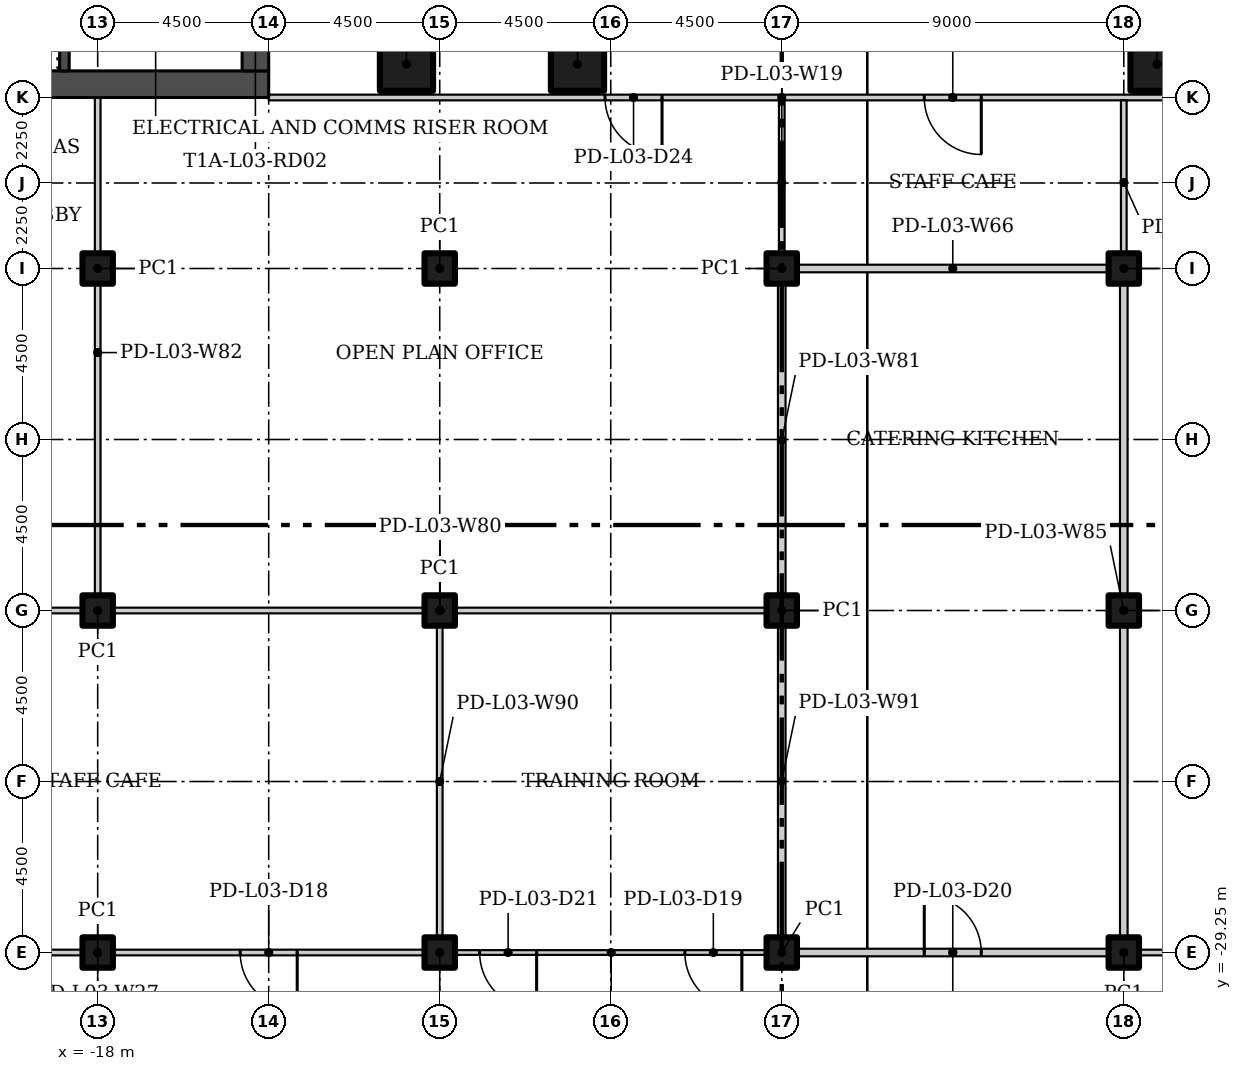
"""IFC4 building model, lengths in metres.
Left out: names, types, materials, properties, quantities, classifications, styles, units other than length and angle.
Written with IfcOpenShell. Run it as: python <this file> out.ifc"""

import sys

from ifc_helpers import new_model, si_unit, direction, frame, frame_2d, origin, origin_2d, place, context, subcontext, project, spatial, rectangle, hollow_rectangle, extrude, element, fill, save


model = new_model("IFC4")
c1 = context("Model", 3, precision=1e-05, world=origin(), true_north=direction((0.0, 1.0)))
c2 = subcontext(c1, "Body", "Model", "MODEL_VIEW")
j1 = project(units=[si_unit("LENGTHUNIT", "METRE"), si_unit("PLANEANGLEUNIT", "RADIAN")], contexts=[c1])
p1 = place(None, origin())
s1 = spatial("IfcSite", under=j1, at=p1, CompositionType="ELEMENT")
p2 = place(p1, origin())
s2 = spatial("IfcBuilding", under=s1, at=p2, CompositionType="ELEMENT")
p3 = place(p2, frame((0.0, 0.0, 18.5)))
s3 = spatial("IfcBuildingStorey", under=s2, at=p3, CompositionType="ELEMENT", Elevation=18.5)
for number, where in (
    (1, (-9.875, -5.875, 0.0)),
    (2, (-5.375, -5.875, 0.0)),
    (3, (9.875, -5.875, 0.0)),
):
    element("IfcColumn", number, at=place(p3, frame(where)), inside=s3, PredefinedType="COLUMN", context=c2, shape_type="SweptSolid", body=[
        extrude(hollow_rectangle(XDim=1.4, YDim=1.4, WallThickness=0.06, at=origin_2d()), origin(), (0.0, 0.0, 1.0), 4.6),
    ])
for number, where in (
    (4, (-18.0, -29.25, 0.0)),
    (5, (-18.0, -20.25, 0.0)),
    (6, (-18.0, -11.25, 0.0)),
    (7, (-9.0, -29.25, 0.0)),
    (8, (-9.0, -20.25, 0.0)),
    (9, (-9.0, -11.25, 0.0)),
    (10, (0.0, -29.25, 0.0)),
    (11, (0.0, -20.25, 0.0)),
    (12, (0.0, -11.25, 0.0)),
    (13, (9.0, -29.25, 0.0)),
    (14, (9.0, -20.25, 0.0)),
    (15, (9.0, -11.25, 0.0)),
):
    element("IfcColumn", number, at=place(p3, frame(where)), inside=s3, PredefinedType="COLUMN", context=c2, shape_type="SweptSolid", body=[
        extrude(hollow_rectangle(XDim=0.8, YDim=0.8, WallThickness=0.03, at=origin_2d()), origin(), (0.0, 0.0, 1.0), 4.6),
    ])
p4 = place(p3, frame((13.5, -6.75, 0.0), z_axis=(0.0, 0.0, 1.0), x_axis=(-1.0, 0.0, 0.0)))
e16 = element("IfcWall", 16, at=p4, inside=s3, PredefinedType="PARTITIONING", context=c2, shape_type="SweptSolid", body=[
    extrude(rectangle(XDim=27.0, YDim=0.15, at=frame_2d((13.5, 0.0))), origin(), (0.0, 0.0, 1.0), 4.6),
])
p5 = place(p4, frame((8.25, 0.0, 0.0)))
e17 = element("IfcOpeningElement", 17, at=p5, cuts=e16, PredefinedType="OPENING", context=c2, shape_type="SweptSolid", body=[
    extrude(rectangle(XDim=1.5, YDim=2.1, at=frame_2d((0.75, 1.05))), frame((0.0, 0.085, 0.0), z_axis=(0.0, -1.0, 0.0), x_axis=(1.0, 0.0, 0.0)), (0.0, 0.0, 1.0), 0.17),
])
p6 = place(p4, frame((16.65, 0.0, 0.0)))
e18 = element("IfcOpeningElement", 18, at=p6, cuts=e16, PredefinedType="OPENING", context=c2, shape_type="SweptSolid", body=[
    extrude(rectangle(XDim=1.5, YDim=2.1, at=frame_2d((0.75, 1.05))), frame((0.0, 0.085, 0.0), z_axis=(0.0, -1.0, 0.0), x_axis=(1.0, 0.0, 0.0)), (0.0, 0.0, 1.0), 0.17),
])
p7 = place(p3, frame((8.9, -29.25, 0.0)))
e19 = element("IfcWall", 19, at=p7, inside=s3, PredefinedType="PARTITIONING", context=c2, shape_type="SweptSolid", body=[
    extrude(rectangle(XDim=9.175, YDim=0.15, at=frame_2d((4.587, 0.0))), origin(), (0.0, 0.0, 1.0), 4.6),
])
p8 = place(p7, frame((3.85, 0.0, 0.0)))
e20 = element("IfcOpeningElement", 20, at=p8, cuts=e19, PredefinedType="OPENING", context=c2, shape_type="SweptSolid", body=[
    extrude(rectangle(XDim=1.5, YDim=2.1, at=frame_2d((0.75, 1.05))), frame((0.0, 0.085, 0.0), z_axis=(0.0, -1.0, 0.0), x_axis=(1.0, 0.0, 0.0)), (0.0, 0.0, 1.0), 0.17),
])
p9 = place(p3, frame((-8.925, -29.25, 0.0), z_axis=(0.0, 0.0, 1.0), x_axis=(-1.0, 0.0, 0.0)))
e21 = element("IfcWall", 21, at=p9, inside=s3, PredefinedType="PARTITIONING", context=c2, shape_type="SweptSolid", body=[
    extrude(rectangle(XDim=18.15, YDim=0.15, at=frame_2d((9.075, 0.0))), origin(), (0.0, 0.0, 1.0), 4.6),
])
p10 = place(p9, frame((3.825, 0.0, 0.0)))
e22 = element("IfcOpeningElement", 22, at=p10, cuts=e21, PredefinedType="OPENING", context=c2, shape_type="SweptSolid", body=[
    extrude(rectangle(XDim=1.5, YDim=2.1, at=frame_2d((0.75, 1.05))), frame((0.0, 0.085, 0.0), z_axis=(0.0, -1.0, 0.0), x_axis=(1.0, 0.0, 0.0)), (0.0, 0.0, 1.0), 0.17),
])
p11 = place(p3, frame((-0.1, -29.25, 0.0)))
e23 = element("IfcWall", 23, at=p11, inside=s3, PredefinedType="PARTITIONING", context=c2, shape_type="SweptSolid", body=[
    extrude(rectangle(XDim=9.2, YDim=0.2, at=frame_2d((4.6, 0.0))), origin(), (0.0, 0.0, 1.0), 4.6),
])
p12 = place(p11, frame((3.85, 0.0, 0.0)))
e24 = element("IfcOpeningElement", 24, at=p12, cuts=e23, PredefinedType="OPENING", context=c2, shape_type="SweptSolid", body=[
    extrude(rectangle(XDim=1.5, YDim=2.4, at=frame_2d((0.75, 1.2))), frame((0.0, 0.11, 0.0), z_axis=(0.0, -1.0, 0.0), x_axis=(1.0, 0.0, 0.0)), (0.0, 0.0, 1.0), 0.22),
])
p13 = place(p3, frame((0.1, -29.25, 0.0), z_axis=(0.0, 0.0, 1.0), x_axis=(-1.0, 0.0, 0.0)))
e25 = element("IfcWall", 25, at=p13, inside=s3, PredefinedType="PARTITIONING", context=c2, shape_type="SweptSolid", body=[
    extrude(rectangle(XDim=9.175, YDim=0.125, at=frame_2d((4.587, 0.0))), origin(), (0.0, 0.0, 1.0), 4.6),
])
p14 = place(p13, frame((1.15, 0.0, 0.0)))
e26 = element("IfcOpeningElement", 26, at=p14, cuts=e25, PredefinedType="OPENING", context=c2, shape_type="SweptSolid", body=[
    extrude(rectangle(XDim=1.5, YDim=2.1, at=frame_2d((0.75, 1.05))), frame((0.0, 0.073, 0.0), z_axis=(0.0, -1.0, 0.0), x_axis=(1.0, 0.0, 0.0)), (0.0, 0.0, 1.0), 0.145),
])
p15 = place(p13, frame((6.55, 0.0, 0.0)))
e27 = element("IfcOpeningElement", 27, at=p15, cuts=e25, PredefinedType="OPENING", context=c2, shape_type="SweptSolid", body=[
    extrude(rectangle(XDim=1.5, YDim=2.1, at=frame_2d((0.75, 1.05))), frame((0.0, 0.073, 0.0), z_axis=(0.0, -1.0, 0.0), x_axis=(1.0, 0.0, 0.0)), (0.0, 0.0, 1.0), 0.145),
])
p16 = place(p3, frame((9.1, -11.25, 0.0), z_axis=(0.0, 0.0, 1.0), x_axis=(-1.0, 0.0, 0.0)))
e28 = element("IfcWall", 28, at=p16, inside=s3, PredefinedType="PARTITIONING", context=c2, shape_type="SweptSolid", body=[
    extrude(rectangle(XDim=9.2, YDim=0.2, at=frame_2d((4.6, 0.0))), origin(), (0.0, 0.0, 1.0), 4.6),
])
p17 = place(p3, frame((-18.075, -20.25, 0.0)))
e29 = element("IfcWall", 29, at=p17, inside=s3, PredefinedType="PARTITIONING", context=c2, shape_type="SweptSolid", body=[
    extrude(rectangle(XDim=18.175, YDim=0.15, at=frame_2d((9.087, 0.0))), origin(), (0.0, 0.0, 1.0), 4.6),
])
p18 = place(p3, frame((0.0, -20.175, 0.0), z_axis=(0.0, 0.0, 1.0), x_axis=(0.0, 1.0, 0.0)))
e30 = element("IfcWall", 30, at=p18, inside=s3, PredefinedType="PARTITIONING", context=c2, shape_type="SweptSolid", body=[
    extrude(rectangle(XDim=8.825, YDim=0.2, at=frame_2d((4.413, 0.0))), origin(), (0.0, 0.0, 1.0), 4.6),
])
p19 = place(p3, frame((-18.0, -6.75, 0.0), z_axis=(0.0, 0.0, 1.0), x_axis=(0.0, -1.0, 0.0)))
e31 = element("IfcWall", 31, at=p19, inside=s3, PredefinedType="PARTITIONING", context=c2, shape_type="SweptSolid", body=[
    extrude(rectangle(XDim=13.425, YDim=0.15, at=frame_2d((6.712, 0.0))), origin(), (0.0, 0.0, 1.0), 4.6),
])
p20 = place(p3, frame((0.0, -11.15, 0.0), z_axis=(0.0, 0.0, 1.0), x_axis=(0.0, 1.0, 0.0)))
e32 = element("IfcWall", 32, at=p20, inside=s3, PredefinedType="PARTITIONING", context=c2, shape_type="SweptSolid", body=[
    extrude(rectangle(XDim=4.325, YDim=0.15, at=frame_2d((2.163, 0.0))), origin(), (0.0, 0.0, 1.0), 4.6),
])
p21 = place(p3, frame((9.0, -11.35, 0.0), z_axis=(0.0, 0.0, 1.0), x_axis=(0.0, -1.0, 0.0)))
e33 = element("IfcWall", 33, at=p21, inside=s3, PredefinedType="PARTITIONING", context=c2, shape_type="SweptSolid", body=[
    extrude(rectangle(XDim=17.8, YDim=0.2, at=frame_2d((8.9, 0.0))), origin(), (0.0, 0.0, 1.0), 4.6),
])
p22 = place(p3, frame((9.0, -6.825, 0.0), z_axis=(0.0, 0.0, 1.0), x_axis=(0.0, -1.0, 0.0)))
e34 = element("IfcWall", 34, at=p22, inside=s3, PredefinedType="PARTITIONING", context=c2, shape_type="SweptSolid", body=[
    extrude(rectangle(XDim=4.325, YDim=0.15, at=frame_2d((2.163, 0.0))), origin(), (0.0, 0.0, 1.0), 4.6),
])
p23 = place(p3, frame((-17.925, -20.25, 0.0), z_axis=(0.0, 0.0, 1.0), x_axis=(-1.0, 0.0, 0.0)))
e35 = element("IfcWall", 35, at=p23, inside=s3, PredefinedType="PARTITIONING", context=c2, shape_type="SweptSolid", body=[
    extrude(rectangle(XDim=9.15, YDim=0.15, at=frame_2d((4.575, 0.0))), origin(), (0.0, 0.0, 1.0), 4.6),
])
p24 = place(p3, frame((-9.0, -29.175, 0.0), z_axis=(0.0, 0.0, 1.0), x_axis=(0.0, 1.0, 0.0)))
e36 = element("IfcWall", 36, at=p24, inside=s3, PredefinedType="PARTITIONING", context=c2, shape_type="SweptSolid", body=[
    extrude(rectangle(XDim=8.85, YDim=0.15, at=frame_2d((4.425, 0.0))), origin(), (0.0, 0.0, 1.0), 4.6),
])
p25 = place(p3, frame((0.0, -20.325, 0.0), z_axis=(0.0, 0.0, 1.0), x_axis=(0.0, -1.0, 0.0)))
e37 = element("IfcWall", 37, at=p25, inside=s3, PredefinedType="PARTITIONING", context=c2, shape_type="SweptSolid", body=[
    extrude(rectangle(XDim=8.825, YDim=0.2, at=frame_2d((4.413, 0.0))), origin(), (0.0, 0.0, 1.0), 4.6),
])
p26 = place(p3, frame((-27.0, -6.4, 0.0)))
e38 = element("IfcWall", 38, at=p26, inside=s3, PredefinedType="SHEAR", context=c2, shape_type="SweptSolid", body=[
    extrude(rectangle(XDim=13.5, YDim=0.7, at=frame_2d((6.75, 0.0))), origin(), (0.0, 0.0, 1.0), 4.6),
])
p27 = place(p3, frame((-13.85, 6.05, 0.0), z_axis=(0.0, 0.0, 1.0), x_axis=(0.0, -1.0, 0.0)))
e39 = element("IfcWall", 39, at=p27, inside=s3, PredefinedType="SHEAR", context=c2, shape_type="SweptSolid", body=[
    extrude(rectangle(XDim=12.1, YDim=0.7, at=frame_2d((6.05, 0.0))), origin(), (0.0, 0.0, 1.0), 4.6),
])
p28 = place(p27, frame((10.1, 0.0, 0.0)))
e40 = element("IfcOpeningElement", 40, at=p28, cuts=e39, PredefinedType="OPENING", context=c2, shape_type="SweptSolid", body=[
    extrude(rectangle(XDim=1.2, YDim=2.1, at=frame_2d((0.6, 1.05))), frame((0.0, 0.36, 0.0), z_axis=(0.0, -1.0, 0.0), x_axis=(1.0, 0.0, 0.0)), (0.0, 0.0, 1.0), 0.72),
])
p29 = place(p27, frame((3.9, 0.0, 0.0)))
e41 = element("IfcOpeningElement", 41, at=p29, cuts=e39, PredefinedType="OPENING", context=c2, shape_type="SweptSolid", body=[
    extrude(rectangle(XDim=1.8, YDim=2.4, at=frame_2d((0.9, 1.2))), frame((0.0, 0.36, 0.0), z_axis=(0.0, -1.0, 0.0), x_axis=(1.0, 0.0, 0.0)), (0.0, 0.0, 1.0), 0.72),
])
p30 = place(p3, frame((-18.875, -6.05, 0.0), z_axis=(0.0, 0.0, 1.0), x_axis=(0.0, 1.0, 0.0)))
e42 = element("IfcWall", 42, at=p30, inside=s3, PredefinedType="SHEAR", context=c2, shape_type="SweptSolid", body=[
    extrude(rectangle(XDim=2.55, YDim=0.25, at=frame_2d((1.275, 0.0))), origin(), (0.0, 0.0, 1.0), 4.6),
])
p31 = place(p10, origin())
e43 = element("IfcDoor", 43, at=p31, inside=s3, OperationType="DOUBLE_DOOR_SINGLE_SWING", PredefinedType="DOOR", context=c2, shape_type="SweptSolid", body=[
    extrude(rectangle(XDim=1.5, YDim=2.1, at=frame_2d((0.75, 1.05))), frame((0.0, 0.025, 0.0), z_axis=(0.0, -1.0, 0.0), x_axis=(1.0, 0.0, 0.0)), (0.0, 0.0, 1.0), 0.05),
])
fill(e22, e43)
p32 = place(p14, origin())
e44 = element("IfcDoor", 44, at=p32, inside=s3, OperationType="DOUBLE_DOOR_SINGLE_SWING", PredefinedType="DOOR", context=c2, shape_type="SweptSolid", body=[
    extrude(rectangle(XDim=1.5, YDim=2.1, at=frame_2d((0.75, 1.05))), frame((0.0, 0.025, 0.0), z_axis=(0.0, -1.0, 0.0), x_axis=(1.0, 0.0, 0.0)), (0.0, 0.0, 1.0), 0.05),
])
fill(e26, e44)
p33 = place(p12, origin())
e45 = element("IfcDoor", 45, at=p33, inside=s3, OperationType="DOUBLE_DOOR_SINGLE_SWING", PredefinedType="DOOR", context=c2, shape_type="SweptSolid", body=[
    extrude(rectangle(XDim=1.5, YDim=2.4, at=frame_2d((0.75, 1.2))), frame((0.0, 0.025, 0.0), z_axis=(0.0, -1.0, 0.0), x_axis=(1.0, 0.0, 0.0)), (0.0, 0.0, 1.0), 0.05),
])
fill(e24, e45)
p34 = place(p15, origin())
e46 = element("IfcDoor", 46, at=p34, inside=s3, OperationType="DOUBLE_DOOR_SINGLE_SWING", PredefinedType="DOOR", context=c2, shape_type="SweptSolid", body=[
    extrude(rectangle(XDim=1.5, YDim=2.1, at=frame_2d((0.75, 1.05))), frame((0.0, 0.025, 0.0), z_axis=(0.0, -1.0, 0.0), x_axis=(1.0, 0.0, 0.0)), (0.0, 0.0, 1.0), 0.05),
])
fill(e27, e46)
p35 = place(p5, origin())
e47 = element("IfcDoor", 47, at=p35, inside=s3, OperationType="DOUBLE_DOOR_SINGLE_SWING", PredefinedType="DOOR", context=c2, shape_type="SweptSolid", body=[
    extrude(rectangle(XDim=1.5, YDim=2.1, at=frame_2d((0.75, 1.05))), frame((0.0, 0.025, 0.0), z_axis=(0.0, -1.0, 0.0), x_axis=(1.0, 0.0, 0.0)), (0.0, 0.0, 1.0), 0.05),
])
fill(e17, e47)
p36 = place(p6, origin())
e48 = element("IfcDoor", 48, at=p36, inside=s3, OperationType="DOUBLE_DOOR_SINGLE_SWING", PredefinedType="DOOR", context=c2, shape_type="SweptSolid", body=[
    extrude(rectangle(XDim=1.5, YDim=2.1, at=frame_2d((0.75, 1.05))), frame((0.0, 0.025, 0.0), z_axis=(0.0, -1.0, 0.0), x_axis=(1.0, 0.0, 0.0)), (0.0, 0.0, 1.0), 0.05),
])
fill(e18, e48)
save(model, sys.argv[1])
